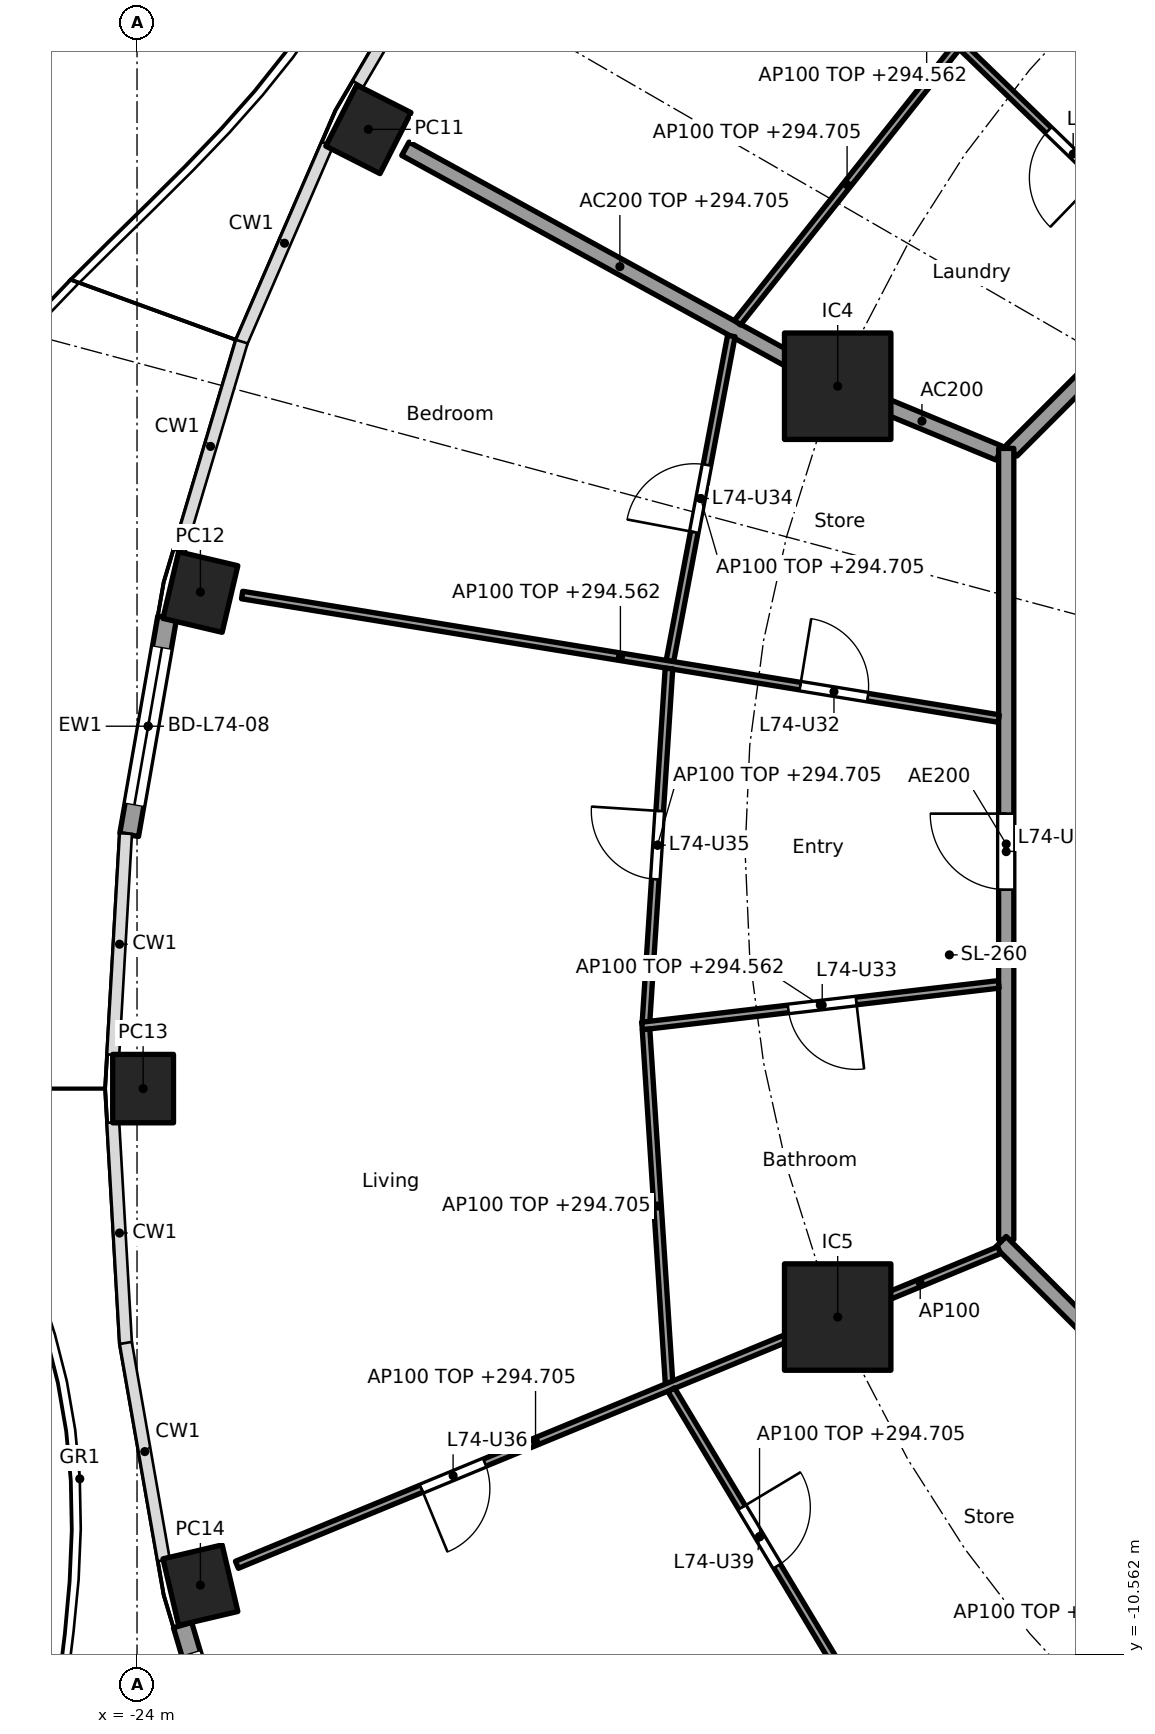
"""IFC4 building model, lengths in metres.
Left out: names, types, materials, properties, quantities, classifications, styles, units other than length and angle.
Written with IfcOpenShell. Run it as: python <this file> out.ifc"""

import sys

from ifc_helpers import new_model, si_unit, direction, frame, frame_2d, origin, origin_2d, place, context, subcontext, project, spatial, rectangle, hollow_rectangle, extrude, element, fill, save


model = new_model("IFC4")
c1 = context("Model", 3, precision=1e-05, world=origin(), true_north=direction((0.0, 1.0)))
c2 = subcontext(c1, "Body", "Model", "MODEL_VIEW")
j1 = project(units=[si_unit("LENGTHUNIT", "METRE"), si_unit("PLANEANGLEUNIT", "RADIAN")], contexts=[c1])
p1 = place(None, origin())
s1 = spatial("IfcSite", under=j1, at=p1, CompositionType="ELEMENT")
p2 = place(p1, origin())
s2 = spatial("IfcBuilding", under=s1, at=p2, CompositionType="ELEMENT")
p3 = place(p2, frame((0.0, 0.0, 291.8)))
s3 = spatial("IfcBuildingStorey", under=s2, at=p3, CompositionType="ELEMENT", Elevation=291.8)
for number, where, z_axis, x_axis in (
    (1, (-20.957, 9.502, 0.0), (0.0, 0.0, 1.0), (-0.452, -0.892, 0.0)),
    (2, (-23.166, 3.415, 0.0), (0.0, 0.0, 1.0), (-0.229, -0.973, 0.0)),
    (3, (-23.92, -3.118, 0.0), (0.0, 0.0, 1.0), (0.0, -1.0, 0.0)),
    (4, (-23.166, -9.65, 0.0), (0.0, 0.0, 1.0), (0.229, -0.973, 0.0)),
):
    element("IfcColumn", number, at=place(p3, frame(where, z_axis=z_axis, x_axis=x_axis)), inside=s3, PredefinedType="COLUMN", context=c2, shape_type="SweptSolid", body=[
        extrude(hollow_rectangle(XDim=0.9, YDim=0.8, WallThickness=0.028, at=origin_2d()), origin(), (0.0, 0.0, 1.0), 3.7),
    ])
for number, where, z_axis, x_axis in (
    (5, (-14.782, 6.123, 0.0), (0.0, 0.0, 1.0), (1.0, 0.0, 0.0)),
    (6, (-14.782, -6.123, 0.0), (0.0, 0.0, 1.0), (1.0, 0.0, 0.0)),
):
    element("IfcColumn", number, at=place(p3, frame(where, z_axis=z_axis, x_axis=x_axis)), inside=s3, PredefinedType="COLUMN", context=c2, shape_type="SweptSolid", body=[
        extrude(rectangle(XDim=1.4, YDim=1.4, at=origin_2d()), origin(), (0.0, 0.0, 1.0), 3.7),
    ])
p4 = place(p3, frame((-24.103, 0.22, 0.0), z_axis=(0.0, 0.0, 1.0), x_axis=(0.172182411767, 0.985065082661, 0.0)))
e7 = element("IfcWall", 7, at=p4, inside=s3, PredefinedType="SOLIDWALL", context=c2, shape_type="SweptSolid", body=[
    extrude(rectangle(XDim=2.903, YDim=0.25, at=frame_2d((1.451, 0.0))), origin(), (0.0, 0.0, 1.0), 3.44),
])
p5 = place(p4, frame((0.401, 0.0, 0.0)))
e8 = element("IfcOpeningElement", 8, at=p5, cuts=e7, PredefinedType="OPENING", context=c2, shape_type="SweptSolid", body=[
    extrude(rectangle(XDim=2.1, YDim=2.4, at=frame_2d((1.05, 1.2))), frame((0.0, 0.135, 0.0), z_axis=(0.0, -1.0, 0.0), x_axis=(1.0, 0.0, 0.0)), (0.0, 0.0, 1.0), 0.27),
])
p6 = place(p3, frame((-22.578, -12.932, 0.0), z_axis=(0.0, 0.0, 1.0), x_axis=(-0.285899456462, 0.958259620768, 0.0)))
e9 = element("IfcWall", 9, at=p6, inside=s3, PredefinedType="SOLIDWALL", context=c2, shape_type="SweptSolid", body=[
    extrude(rectangle(XDim=2.877, YDim=0.25, at=frame_2d((1.438, 0.0))), origin(), (0.0, 0.0, 1.0), 3.44),
])
p7 = place(p6, frame((0.389, 0.0, 0.0)))
e10 = element("IfcOpeningElement", 10, at=p7, cuts=e9, PredefinedType="OPENING", context=c2, shape_type="SweptSolid", body=[
    extrude(rectangle(XDim=2.1, YDim=2.4, at=frame_2d((1.05, 1.2))), frame((0.0, 0.135, 0.0), z_axis=(0.0, -1.0, 0.0), x_axis=(1.0, 0.0, 0.0)), (0.0, 0.0, 1.0), 0.27),
])
p8 = place(p3, frame((-12.657, 5.243, 0.0), z_axis=(0.0, 0.0, 1.0), x_axis=(-0.923869415315, 0.382707856524, 0.0)))
e11 = element("IfcWall", 11, at=p8, inside=s3, PredefinedType="PARTITIONING", context=c2, shape_type="SweptSolid", body=[
    extrude(rectangle(XDim=2.2, YDim=0.2, at=frame_2d((1.1, 0.0))), origin(), (0.0, 0.0, 1.0), 3.44),
])
p9 = place(p3, frame((-14.826, 6.147, 0.0), z_axis=(0.0, 0.0, 1.0), x_axis=(-0.876484755865, 0.481429613481, 0.0)))
e12 = element("IfcWall", 12, at=p9, inside=s3, PredefinedType="PARTITIONING", context=c2, shape_type="SweptSolid", body=[
    extrude(rectangle(XDim=6.439, YDim=0.2, at=frame_2d((3.219, 0.0))), origin(), (0.0, 0.0, 1.0), 2.905),
])
p10 = place(p3, frame((-5.275, 12.494, 0.0), z_axis=(0.0, 0.0, 1.0), x_axis=(-0.707106781187, -0.707106781187, 0.0)))
e13 = element("IfcWall", 13, at=p10, inside=s3, PredefinedType="PARTITIONING", context=c2, shape_type="SweptSolid", body=[
    extrude(rectangle(XDim=10.209, YDim=0.2, at=frame_2d((5.104, 0.0))), origin(), (0.0, 0.0, 1.0), 3.44),
])
p11 = place(p10, frame((4.604, 0.0, 0.0)))
e14 = element("IfcOpeningElement", 14, at=p11, cuts=e13, PredefinedType="OPENING", context=c2, shape_type="SweptSolid", body=[
    extrude(rectangle(XDim=1.0, YDim=2.1, at=frame_2d((0.5, 1.05))), frame((0.0, 0.11, 0.0), z_axis=(0.0, -1.0, 0.0), x_axis=(1.0, 0.0, 0.0)), (0.0, 0.0, 1.0), 0.22),
])
p12 = place(p3, frame((-12.565, 5.304, 0.0), z_axis=(0.0, 0.0, 1.0), x_axis=(0.0, -1.0, 0.0)))
e15 = element("IfcWall", 15, at=p12, inside=s3, PredefinedType="PARTITIONING", context=c2, shape_type="SweptSolid", body=[
    extrude(rectangle(XDim=10.409, YDim=0.2, at=frame_2d((5.205, 0.0))), origin(), (0.0, 0.0, 1.0), 3.44),
])
p13 = place(p12, frame((4.804, 0.0, 0.0)))
e16 = element("IfcOpeningElement", 16, at=p13, cuts=e15, PredefinedType="OPENING", context=c2, shape_type="SweptSolid", body=[
    extrude(rectangle(XDim=1.0, YDim=2.1, at=frame_2d((0.5, 1.05))), frame((0.0, 0.11, 0.0), z_axis=(0.0, -1.0, 0.0), x_axis=(1.0, 0.0, 0.0)), (0.0, 0.0, 1.0), 0.22),
])
p14 = place(p3, frame((-12.635, -5.134, 0.0), z_axis=(0.0, 0.0, 1.0), x_axis=(0.707106781187, -0.707106781187, 0.0)))
e17 = element("IfcWall", 17, at=p14, inside=s3, PredefinedType="PARTITIONING", context=c2, shape_type="SweptSolid", body=[
    extrude(rectangle(XDim=10.609, YDim=0.2, at=frame_2d((5.305, 0.0))), origin(), (0.0, 0.0, 1.0), 3.44),
])
p15 = place(p3, frame((-7.709, 10.197, 0.0), z_axis=(0.0, 0.0, 1.0), x_axis=(-0.515516160663, 0.856879856278, 0.0)))
e18 = element("IfcWall", 18, at=p15, inside=s3, PredefinedType="PARTITIONING", context=c2, shape_type="SweptSolid", body=[
    extrude(rectangle(XDim=9.426, YDim=0.1, at=frame_2d((4.713, 0.0))), origin(), (0.0, 0.0, 1.0), 2.762),
])
p16 = place(p15, frame((1.615, 0.0, 0.0)))
e19 = element("IfcOpeningElement", 19, at=p16, cuts=e18, PredefinedType="OPENING", context=c2, shape_type="SweptSolid", body=[
    extrude(rectangle(XDim=0.9, YDim=2.1, at=frame_2d((0.45, 1.05))), frame((0.0, 0.06, 0.0), z_axis=(0.0, -1.0, 0.0), x_axis=(1.0, 0.0, 0.0)), (0.0, 0.0, 1.0), 0.12),
])
p17 = place(p15, frame((6.328, 0.0, 0.0)))
e20 = element("IfcOpeningElement", 20, at=p17, cuts=e18, PredefinedType="OPENING", context=c2, shape_type="SweptSolid", body=[
    extrude(rectangle(XDim=0.9, YDim=2.1, at=frame_2d((0.45, 1.05))), frame((0.0, 0.06, 0.0), z_axis=(0.0, -1.0, 0.0), x_axis=(1.0, 0.0, 0.0)), (0.0, 0.0, 1.0), 0.12),
])
p18 = place(p3, frame((-10.183, 7.727, 0.0), z_axis=(0.0, 0.0, 1.0), x_axis=(-0.719063433856, 0.694944442449, 0.0)))
e21 = element("IfcWall", 21, at=p18, inside=s3, PredefinedType="PARTITIONING", context=c2, shape_type="SweptSolid", body=[
    extrude(rectangle(XDim=9.535, YDim=0.1, at=frame_2d((4.768, 0.0))), origin(), (0.0, 0.0, 1.0), 2.762),
])
p19 = place(p18, frame((1.637, 0.0, 0.0)))
e22 = element("IfcOpeningElement", 22, at=p19, cuts=e21, PredefinedType="OPENING", context=c2, shape_type="SweptSolid", body=[
    extrude(rectangle(XDim=0.9, YDim=2.1, at=frame_2d((0.45, 1.05))), frame((0.0, 0.06, 0.0), z_axis=(0.0, -1.0, 0.0), x_axis=(1.0, 0.0, 0.0)), (0.0, 0.0, 1.0), 0.12),
])
p20 = place(p18, frame((6.405, 0.0, 0.0)))
e23 = element("IfcOpeningElement", 23, at=p20, cuts=e21, PredefinedType="OPENING", context=c2, shape_type="SweptSolid", body=[
    extrude(rectangle(XDim=0.9, YDim=2.1, at=frame_2d((0.45, 1.05))), frame((0.0, 0.06, 0.0), z_axis=(0.0, -1.0, 0.0), x_axis=(1.0, 0.0, 0.0)), (0.0, 0.0, 1.0), 0.12),
])
p21 = place(p3, frame((-13.216, 10.589, 0.0), z_axis=(0.0, 0.0, 1.0), x_axis=(-0.622251572882, -0.782817335045, 0.0)))
e24 = element("IfcWall", 24, at=p21, inside=s3, PredefinedType="PARTITIONING", context=c2, shape_type="SweptSolid", body=[
    extrude(rectangle(XDim=4.636, YDim=0.1, at=frame_2d((2.318, 0.0))), origin(), (0.0, 0.0, 1.0), 2.905),
])
p22 = place(p3, frame((-16.181, 6.783, 0.0), z_axis=(0.0, 0.0, 1.0), x_axis=(-0.185670583745, -0.982612046706, 0.0)))
e25 = element("IfcWall", 25, at=p22, inside=s3, PredefinedType="PARTITIONING", context=c2, shape_type="SweptSolid", body=[
    extrude(rectangle(XDim=4.351, YDim=0.1, at=frame_2d((2.176, 0.0))), origin(), (0.0, 0.0, 1.0), 2.905),
])
p23 = place(p22, frame((1.726, 0.0, 0.0)))
e26 = element("IfcOpeningElement", 26, at=p23, cuts=e25, PredefinedType="OPENING", context=c2, shape_type="SweptSolid", body=[
    extrude(rectangle(XDim=0.9, YDim=2.1, at=frame_2d((0.45, 1.05))), frame((0.0, 0.06, 0.0), z_axis=(0.0, -1.0, 0.0), x_axis=(1.0, 0.0, 0.0)), (0.0, 0.0, 1.0), 0.12),
])
p24 = place(p3, frame((-12.664, 1.751, 0.0), z_axis=(0.0, 0.0, 1.0), x_axis=(-0.986935394566, 0.161116501183, 0.0)))
e27 = element("IfcWall", 27, at=p24, inside=s3, PredefinedType="PARTITIONING", context=c2, shape_type="SweptSolid", body=[
    extrude(rectangle(XDim=10.086, YDim=0.1, at=frame_2d((5.043, 0.0))), origin(), (0.0, 0.0, 1.0), 2.762),
])
p25 = place(p24, frame((1.746, 0.0, 0.0)))
e28 = element("IfcOpeningElement", 28, at=p25, cuts=e27, PredefinedType="OPENING", context=c2, shape_type="SweptSolid", body=[
    extrude(rectangle(XDim=0.9, YDim=2.1, at=frame_2d((0.45, 1.05))), frame((0.0, 0.06, 0.0), z_axis=(0.0, -1.0, 0.0), x_axis=(1.0, 0.0, 0.0)), (0.0, 0.0, 1.0), 0.12),
])
p26 = place(p3, frame((-17.002, 2.409, 0.0), z_axis=(0.0, 0.0, 1.0), x_axis=(-0.064855550758, -0.997894662545, 0.0)))
e29 = element("IfcWall", 29, at=p26, inside=s3, PredefinedType="PARTITIONING", context=c2, shape_type="SweptSolid", body=[
    extrude(rectangle(XDim=4.656, YDim=0.1, at=frame_2d((2.328, 0.0))), origin(), (0.0, 0.0, 1.0), 2.905),
])
p27 = place(p26, frame((1.878, 0.0, 0.0)))
e30 = element("IfcOpeningElement", 30, at=p27, cuts=e29, PredefinedType="OPENING", context=c2, shape_type="SweptSolid", body=[
    extrude(rectangle(XDim=0.9, YDim=2.1, at=frame_2d((0.45, 1.05))), frame((0.0, 0.06, 0.0), z_axis=(0.0, -1.0, 0.0), x_axis=(1.0, 0.0, 0.0)), (0.0, 0.0, 1.0), 0.12),
])
p28 = place(p3, frame((-12.664, -1.746, 0.0), z_axis=(0.0, 0.0, 1.0), x_axis=(-0.993265121683, -0.115863704621, 0.0)))
e31 = element("IfcWall", 31, at=p28, inside=s3, PredefinedType="PARTITIONING", context=c2, shape_type="SweptSolid", body=[
    extrude(rectangle(XDim=4.724, YDim=0.1, at=frame_2d((2.362, 0.0))), origin(), (0.0, 0.0, 1.0), 2.762),
])
p29 = place(p28, frame((1.887, 0.0, 0.0)))
e32 = element("IfcOpeningElement", 32, at=p29, cuts=e31, PredefinedType="OPENING", context=c2, shape_type="SweptSolid", body=[
    extrude(rectangle(XDim=0.9, YDim=2.1, at=frame_2d((0.45, 1.05))), frame((0.0, 0.06, 0.0), z_axis=(0.0, -1.0, 0.0), x_axis=(1.0, 0.0, 0.0)), (0.0, 0.0, 1.0), 0.12),
])
p30 = place(p3, frame((-17.304, -2.338, 0.0), z_axis=(0.0, 0.0, 1.0), x_axis=(0.064981578354, -0.99788646372, 0.0)))
e33 = element("IfcWall", 33, at=p30, inside=s3, PredefinedType="PARTITIONING", context=c2, shape_type="SweptSolid", body=[
    extrude(rectangle(XDim=4.659, YDim=0.1, at=frame_2d((2.329, 0.0))), origin(), (0.0, 0.0, 1.0), 2.905),
])
p31 = place(p3, frame((-12.657, -5.243, 0.0), z_axis=(0.0, 0.0, 1.0), x_axis=(-0.923871314276, -0.382703272338, 0.0)))
e34 = element("IfcWall", 34, at=p31, inside=s3, PredefinedType="PARTITIONING", context=c2, shape_type="SweptSolid", body=[
    extrude(rectangle(XDim=2.249, YDim=0.1, at=frame_2d((1.125, 0.0))), origin(), (0.0, 0.0, 1.0), 3.44),
])
p32 = place(p3, frame((-14.828, -6.142, 0.0), z_axis=(0.0, 0.0, 1.0), x_axis=(-0.924478087429, -0.381235184451, 0.0)))
e35 = element("IfcWall", 35, at=p32, inside=s3, PredefinedType="PARTITIONING", context=c2, shape_type="SweptSolid", body=[
    extrude(rectangle(XDim=8.499, YDim=0.1, at=frame_2d((4.25, 0.0))), origin(), (0.0, 0.0, 1.0), 2.905),
])
p33 = place(p32, frame((4.973, 0.0, 0.0)))
e36 = element("IfcOpeningElement", 36, at=p33, cuts=e35, PredefinedType="OPENING", context=c2, shape_type="SweptSolid", body=[
    extrude(rectangle(XDim=0.9, YDim=2.1, at=frame_2d((0.45, 1.05))), frame((0.0, 0.06, 0.0), z_axis=(0.0, -1.0, 0.0), x_axis=(1.0, 0.0, 0.0)), (0.0, 0.0, 1.0), 0.12),
])
p34 = place(p3, frame((-16.972, -7.08, 0.0), z_axis=(0.0, 0.0, 1.0), x_axis=(0.514989049311, -0.857196756346, 0.0)))
e37 = element("IfcWall", 37, at=p34, inside=s3, PredefinedType="PARTITIONING", context=c2, shape_type="SweptSolid", body=[
    extrude(rectangle(XDim=4.512, YDim=0.1, at=frame_2d((2.256, 0.0))), origin(), (0.0, 0.0, 1.0), 2.905),
])
p35 = place(p34, frame((1.806, 0.0, 0.0)))
e38 = element("IfcOpeningElement", 38, at=p35, cuts=e37, PredefinedType="OPENING", context=c2, shape_type="SweptSolid", body=[
    extrude(rectangle(XDim=0.9, YDim=2.1, at=frame_2d((0.45, 1.05))), frame((0.0, 0.06, 0.0), z_axis=(0.0, -1.0, 0.0), x_axis=(1.0, 0.0, 0.0)), (0.0, 0.0, 1.0), 0.12),
])
p36 = place(p3, frame((-8.958, -8.952, 0.0), z_axis=(0.0, 0.0, 1.0), x_axis=(-0.73876526954, -0.673962815385, 0.0)))
e39 = element("IfcWall", 39, at=p36, inside=s3, PredefinedType="PARTITIONING", context=c2, shape_type="SweptSolid", body=[
    extrude(rectangle(XDim=5.647, YDim=0.1, at=frame_2d((2.824, 0.0))), origin(), (0.0, 0.0, 1.0), 2.762),
])
p37 = place(p5, origin())
e40 = element("IfcDoor", 40, at=p37, inside=s3, OperationType="SLIDING_TO_LEFT", PredefinedType="DOOR", context=c2, shape_type="SweptSolid", body=[
    extrude(rectangle(XDim=2.1, YDim=2.4, at=frame_2d((1.05, 1.2))), frame((0.0, 0.025, 0.0), z_axis=(0.0, -1.0, 0.0), x_axis=(1.0, 0.0, 0.0)), (0.0, 0.0, 1.0), 0.05),
])
fill(e8, e40)
p38 = place(p7, origin())
e41 = element("IfcDoor", 41, at=p38, inside=s3, OperationType="SLIDING_TO_LEFT", PredefinedType="DOOR", context=c2, shape_type="SweptSolid", body=[
    extrude(rectangle(XDim=2.1, YDim=2.4, at=frame_2d((1.05, 1.2))), frame((0.0, 0.025, 0.0), z_axis=(0.0, -1.0, 0.0), x_axis=(1.0, 0.0, 0.0)), (0.0, 0.0, 1.0), 0.05),
])
fill(e10, e41)
p39 = place(p19, origin())
e42 = element("IfcDoor", 42, at=p39, inside=s3, OperationType="SINGLE_SWING_LEFT", PredefinedType="DOOR", context=c2, shape_type="SweptSolid", body=[
    extrude(rectangle(XDim=0.9, YDim=2.1, at=frame_2d((0.45, 1.05))), frame((0.0, 0.025, 0.0), z_axis=(0.0, -1.0, 0.0), x_axis=(1.0, 0.0, 0.0)), (0.0, 0.0, 1.0), 0.05),
])
fill(e22, e42)
p40 = place(p13, frame((1.0, 0.0, 0.0), x_axis=(-1.0, 0.0, 0.0)))
e43 = element("IfcDoor", 43, at=p40, inside=s3, OperationType="SINGLE_SWING_RIGHT", PredefinedType="DOOR", context=c2, shape_type="SweptSolid", body=[
    extrude(rectangle(XDim=1.0, YDim=2.1, at=frame_2d((0.5, 1.05))), frame((0.0, 0.025, 0.0), z_axis=(0.0, -1.0, 0.0), x_axis=(1.0, 0.0, 0.0)), (0.0, 0.0, 1.0), 0.05),
])
fill(e16, e43)
p41 = place(p25, frame((0.9, 0.0, 0.0), x_axis=(-1.0, 0.0, 0.0)))
e44 = element("IfcDoor", 44, at=p41, inside=s3, OperationType="SINGLE_SWING_LEFT", PredefinedType="DOOR", context=c2, shape_type="SweptSolid", body=[
    extrude(rectangle(XDim=0.9, YDim=2.1, at=frame_2d((0.45, 1.05))), frame((0.0, 0.025, 0.0), z_axis=(0.0, -1.0, 0.0), x_axis=(1.0, 0.0, 0.0)), (0.0, 0.0, 1.0), 0.05),
])
fill(e28, e44)
p42 = place(p29, origin())
e45 = element("IfcDoor", 45, at=p42, inside=s3, OperationType="SINGLE_SWING_LEFT", PredefinedType="DOOR", context=c2, shape_type="SweptSolid", body=[
    extrude(rectangle(XDim=0.9, YDim=2.1, at=frame_2d((0.45, 1.05))), frame((0.0, 0.025, 0.0), z_axis=(0.0, -1.0, 0.0), x_axis=(1.0, 0.0, 0.0)), (0.0, 0.0, 1.0), 0.05),
])
fill(e32, e45)
p43 = place(p23, frame((0.9, 0.0, 0.0), x_axis=(-1.0, 0.0, 0.0)))
e46 = element("IfcDoor", 46, at=p43, inside=s3, OperationType="SINGLE_SWING_LEFT", PredefinedType="DOOR", context=c2, shape_type="SweptSolid", body=[
    extrude(rectangle(XDim=0.9, YDim=2.1, at=frame_2d((0.45, 1.05))), frame((0.0, 0.025, 0.0), z_axis=(0.0, -1.0, 0.0), x_axis=(1.0, 0.0, 0.0)), (0.0, 0.0, 1.0), 0.05),
])
fill(e26, e46)
p44 = place(p27, frame((0.9, 0.0, 0.0), x_axis=(-1.0, 0.0, 0.0)))
e47 = element("IfcDoor", 47, at=p44, inside=s3, OperationType="SINGLE_SWING_RIGHT", PredefinedType="DOOR", context=c2, shape_type="SweptSolid", body=[
    extrude(rectangle(XDim=0.9, YDim=2.1, at=frame_2d((0.45, 1.05))), frame((0.0, 0.025, 0.0), z_axis=(0.0, -1.0, 0.0), x_axis=(1.0, 0.0, 0.0)), (0.0, 0.0, 1.0), 0.05),
])
fill(e30, e47)
p45 = place(p33, origin())
e48 = element("IfcDoor", 48, at=p45, inside=s3, OperationType="SINGLE_SWING_RIGHT", PredefinedType="DOOR", context=c2, shape_type="SweptSolid", body=[
    extrude(rectangle(XDim=0.9, YDim=2.1, at=frame_2d((0.45, 1.05))), frame((0.0, 0.025, 0.0), z_axis=(0.0, -1.0, 0.0), x_axis=(1.0, 0.0, 0.0)), (0.0, 0.0, 1.0), 0.05),
])
fill(e36, e48)
p46 = place(p35, origin())
e49 = element("IfcDoor", 49, at=p46, inside=s3, OperationType="SINGLE_SWING_LEFT", PredefinedType="DOOR", context=c2, shape_type="SweptSolid", body=[
    extrude(rectangle(XDim=0.9, YDim=2.1, at=frame_2d((0.45, 1.05))), frame((0.0, 0.025, 0.0), z_axis=(0.0, -1.0, 0.0), x_axis=(1.0, 0.0, 0.0)), (0.0, 0.0, 1.0), 0.05),
])
fill(e38, e49)
save(model, sys.argv[1])
